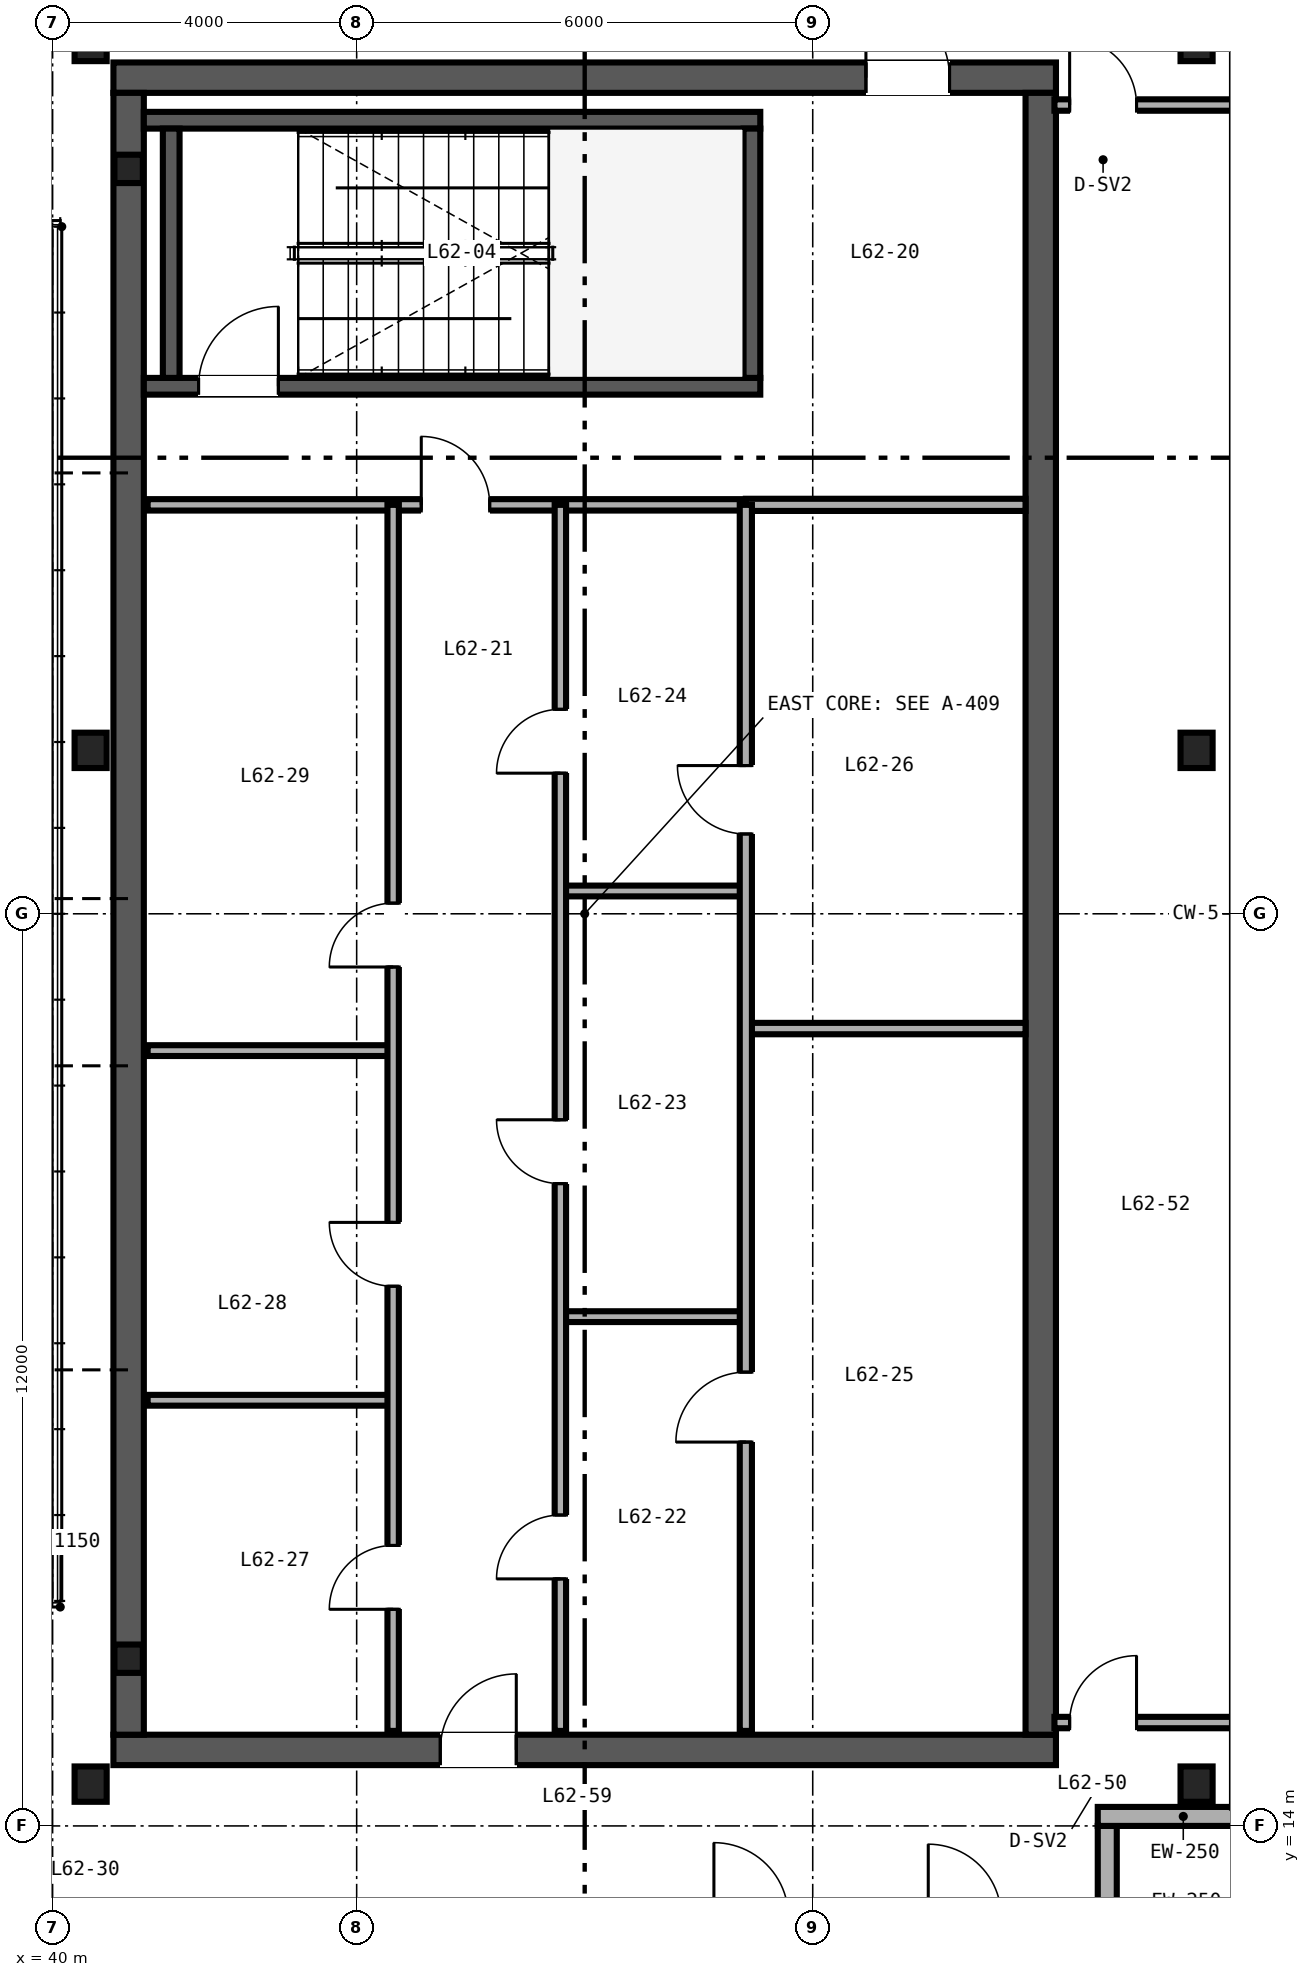
"""IFC4 building model, lengths in metres.
Left out: names, types, materials, properties, quantities, classifications, styles, units other than length and angle.
Written with IfcOpenShell. Run it as: python <this file> out.ifc"""

import sys

from ifc_helpers import new_model, si_unit, direction, frame, frame_2d, origin, origin_2d, place, context, subcontext, project, spatial, rectangle, i_section, extrude, source, transform, mapped, element, fill, save


model = new_model("IFC4")
c1 = context("Model", 3, precision=1e-05, world=origin(), true_north=direction((0.0, 1.0)))
c2 = subcontext(c1, "Body", "Model", "MODEL_VIEW")
j1 = project(units=[si_unit("LENGTHUNIT", "METRE"), si_unit("PLANEANGLEUNIT", "RADIAN")], contexts=[c1])
p1 = place(None, origin())
s1 = spatial("IfcSite", under=j1, at=p1, CompositionType="ELEMENT")
p2 = place(p1, origin())
s2 = spatial("IfcBuilding", under=s1, at=p2, CompositionType="ELEMENT")
p3 = place(p2, frame((0.0, 0.0, 247.2)))
s3 = spatial("IfcBuildingStorey", under=s2, at=p3, CompositionType="ELEMENT", Elevation=247.2)
m1 = source(origin(), c2, "Body", "SweptSolid", [
    extrude(i_section(OverallWidth=0.374, OverallDepth=0.373, WebThickness=0.016, FlangeThickness=0.026, FilletRadius=0.025, at=origin_2d()), origin(), (0.0, 0.0, 1.0), 3.6),
])
for number, where, z_axis, x_axis in (
    (1, (41.0, 16.2, 0.0), (0.0, 0.0, 1.0), (1.0, 0.0, 0.0)),
    (2, (41.0, 35.8, 0.0), (0.0, 0.0, 1.0), (1.0, 0.0, 0.0)),
):
    element("IfcColumn", number, at=place(p3, frame(where, z_axis=z_axis, x_axis=x_axis)), inside=s3, PredefinedType="COLUMN", context=c2, shape_type="MappedRepresentation", body=[
        mapped(m1, transform((0.0, 0.0, 0.0), scale=1.0)),
    ])
p4 = place(p3, frame((40.8, 15.0, 0.0), z_axis=(0.0, 0.0, 1.0), x_axis=(1.0, 0.0, 0.0)))
e3 = element("IfcWall", 3, at=p4, inside=s3, PredefinedType="SHEAR", context=c2, shape_type="SweptSolid", body=[
    extrude(rectangle(XDim=12.4, YDim=0.4, at=frame_2d((6.2, 0.0))), origin(), (0.0, 0.0, 1.0), 3.38),
])
p5 = place(p4, frame((4.3, 0.0, 0.0)))
e4 = element("IfcOpeningElement", 4, at=p5, cuts=e3, PredefinedType="OPENING", context=c2, shape_type="SweptSolid", body=[
    extrude(rectangle(XDim=1.0, YDim=2.15, at=frame_2d((0.5, 1.075))), frame((0.0, 0.21, 0.0), z_axis=(0.0, -1.0, 0.0), x_axis=(1.0, 0.0, 0.0)), (0.0, 0.0, 1.0), 0.42),
])
p6 = place(p3, frame((40.8, 37.0, 0.0), z_axis=(0.0, 0.0, 1.0), x_axis=(1.0, 0.0, 0.0)))
e5 = element("IfcWall", 5, at=p6, inside=s3, PredefinedType="SHEAR", context=c2, shape_type="SweptSolid", body=[
    extrude(rectangle(XDim=12.4, YDim=0.4, at=frame_2d((6.2, 0.0))), origin(), (0.0, 0.0, 1.0), 3.38),
])
p7 = place(p6, frame((9.9, 0.0, 0.0)))
e6 = element("IfcOpeningElement", 6, at=p7, cuts=e5, PredefinedType="OPENING", context=c2, shape_type="SweptSolid", body=[
    extrude(rectangle(XDim=1.1, YDim=2.15, at=frame_2d((0.55, 1.075))), frame((0.0, 0.21, 0.0), z_axis=(0.0, -1.0, 0.0), x_axis=(1.0, 0.0, 0.0)), (0.0, 0.0, 1.0), 0.42),
])
for number, where, z_axis, x_axis in (
    (7, (41.0, 15.2, 0.0), (0.0, 0.0, 1.0), (0.0, 1.0, 0.0)),
    (8, (53.0, 15.2, 0.0), (0.0, 0.0, 1.0), (0.0, 1.0, 0.0)),
):
    element("IfcWall", number, at=place(p3, frame(where, z_axis=z_axis, x_axis=x_axis)), inside=s3, PredefinedType="SHEAR", context=c2, shape_type="SweptSolid", body=[
        extrude(rectangle(XDim=21.6, YDim=0.4, at=frame_2d((10.8, 0.0))), origin(), (0.0, 0.0, 1.0), 3.38),
    ])
p8 = place(p3, frame((41.2, 32.94, 0.0), z_axis=(0.0, 0.0, 1.0), x_axis=(1.0, 0.0, 0.0)))
e9 = element("IfcWall", 9, at=p8, inside=s3, PredefinedType="SHEAR", context=c2, shape_type="SweptSolid", body=[
    extrude(rectangle(XDim=8.11, YDim=0.22, at=frame_2d((4.055, 0.0))), origin(), (0.0, 0.0, 1.0), 3.4),
])
p9 = place(p8, frame((0.72, 0.0, 0.0)))
e10 = element("IfcOpeningElement", 10, at=p9, cuts=e9, PredefinedType="OPENING", context=c2, shape_type="SweptSolid", body=[
    extrude(rectangle(XDim=1.05, YDim=2.15, at=frame_2d((0.525, 1.075))), frame((0.0, 0.12, 0.0), z_axis=(0.0, -1.0, 0.0), x_axis=(1.0, 0.0, 0.0)), (0.0, 0.0, 1.0), 0.24),
])
p10 = place(p3, frame((41.2, 36.44, 0.0), z_axis=(0.0, 0.0, 1.0), x_axis=(1.0, 0.0, 0.0)))
e11 = element("IfcWall", 11, at=p10, inside=s3, PredefinedType="SHEAR", context=c2, shape_type="SweptSolid", body=[
    extrude(rectangle(XDim=8.11, YDim=0.22, at=frame_2d((4.055, 0.0))), origin(), (0.0, 0.0, 1.0), 3.4),
])
for number, where, z_axis, x_axis in (
    (12, (41.56, 33.05, 0.0), (0.0, 0.0, 1.0), (0.0, 1.0, 0.0)),
    (13, (49.2, 33.05, 0.0), (0.0, 0.0, 1.0), (0.0, 1.0, 0.0)),
):
    element("IfcWall", number, at=place(p3, frame(where, z_axis=z_axis, x_axis=x_axis)), inside=s3, PredefinedType="SHEAR", context=c2, shape_type="SweptSolid", body=[
        extrude(rectangle(XDim=3.28, YDim=0.22, at=frame_2d((1.64, 0.0))), origin(), (0.0, 0.0, 1.0), 3.4),
    ])
m2 = source(origin(), c2, "Body", "SweptSolid", [
    extrude(i_section(OverallWidth=0.422, OverallDepth=0.465, WebThickness=0.045, FlangeThickness=0.073, FilletRadius=0.025, at=origin_2d()), origin(), (0.0, 0.0, 1.0), 3.38),
])
for number, where, z_axis, x_axis in (
    (14, (40.5, 14.55, 0.0), (0.0, 0.0, 1.0), (1.0, 0.0, 0.0)),
    (15, (55.05, 14.55, 0.0), (0.0, 0.0, 1.0), (1.0, 0.0, 0.0)),
    (16, (40.5, 28.15, 0.0), (0.0, 0.0, 1.0), (1.0, 0.0, 0.0)),
    (17, (55.05, 28.15, 0.0), (0.0, 0.0, 1.0), (1.0, 0.0, 0.0)),
    (18, (40.5, 37.45, 0.0), (0.0, 0.0, 1.0), (1.0, 0.0, 0.0)),
    (19, (55.05, 37.45, 0.0), (0.0, 0.0, 1.0), (1.0, 0.0, 0.0)),
):
    element("IfcColumn", number, at=place(p3, frame(where, z_axis=z_axis, x_axis=x_axis)), inside=s3, PredefinedType="COLUMN", context=c2, shape_type="MappedRepresentation", body=[
        mapped(m2, transform((0.0, 0.0, 0.0), scale=1.0)),
    ])
p11 = place(p3, frame((53.875, 12.0, 0.0), z_axis=(0.0, 0.0, 1.0), x_axis=(0.0, 1.0, 0.0)))
e20 = element("IfcWall", 20, at=p11, inside=s3, PredefinedType="SOLIDWALL", context=c2, shape_type="SweptSolid", body=[
    extrude(rectangle(XDim=2.0, YDim=0.25, at=frame_2d((1.0, 0.0))), origin(), (0.0, 0.0, 1.0), 3.38),
])
p12 = place(p3, frame((53.75, 14.125, 0.0), z_axis=(0.0, 0.0, 1.0), x_axis=(1.0, 0.0, 0.0)))
e21 = element("IfcWall", 21, at=p12, inside=s3, PredefinedType="SOLIDWALL", context=c2, shape_type="SweptSolid", body=[
    extrude(rectangle(XDim=2.25, YDim=0.25, at=frame_2d((1.125, 0.0))), origin(), (0.0, 0.0, 1.0), 3.38),
])
p13 = place(p3, frame((41.25, 31.38, 0.0), z_axis=(0.0, 0.0, 1.0), x_axis=(1.0, 0.0, 0.0)))
e22 = element("IfcWall", 22, at=p13, inside=s3, PredefinedType="PARTITIONING", context=c2, shape_type="SweptSolid", body=[
    extrude(rectangle(XDim=7.87, YDim=0.15, at=frame_2d((3.935, 0.0))), origin(), (0.0, 0.0, 1.0), 2.48),
])
p14 = place(p13, frame((3.6, 0.0, 0.0)))
e23 = element("IfcOpeningElement", 23, at=p14, cuts=e22, PredefinedType="OPENING", context=c2, shape_type="SweptSolid", body=[
    extrude(rectangle(XDim=0.9, YDim=2.15, at=frame_2d((0.45, 1.075))), frame((0.0, 0.085, 0.0), z_axis=(0.0, -1.0, 0.0), x_axis=(1.0, 0.0, 0.0)), (0.0, 0.0, 1.0), 0.17),
])
for number, where, z_axis, x_axis in (
    (24, (46.68, 20.7, 0.0), (0.0, 0.0, 1.0), (1.0, 0.0, 0.0)),
    (25, (46.68, 26.3, 0.0), (0.0, 0.0, 1.0), (1.0, 0.0, 0.0)),
):
    element("IfcWall", number, at=place(p3, frame(where, z_axis=z_axis, x_axis=x_axis)), inside=s3, PredefinedType="PARTITIONING", context=c2, shape_type="SweptSolid", body=[
        extrude(rectangle(XDim=2.44, YDim=0.142, at=frame_2d((1.22, 0.0))), origin(), (0.0, 0.0, 1.0), 3.38),
    ])
p15 = place(p3, frame((46.68, 15.25, 0.0), z_axis=(0.0, 0.0, 1.0), x_axis=(0.0, 1.0, 0.0)))
e26 = element("IfcWall", 26, at=p15, inside=s3, PredefinedType="PARTITIONING", context=c2, shape_type="SweptSolid", body=[
    extrude(rectangle(XDim=16.13, YDim=0.15, at=frame_2d((8.065, 0.0))), origin(), (0.0, 0.0, 1.0), 2.453),
])
p16 = place(p15, frame((2.0, 0.0, 0.0)))
e27 = element("IfcOpeningElement", 27, at=p16, cuts=e26, PredefinedType="OPENING", context=c2, shape_type="SweptSolid", body=[
    extrude(rectangle(XDim=0.84, YDim=2.1, at=frame_2d((0.42, 1.05))), frame((0.0, 0.085, 0.0), z_axis=(0.0, -1.0, 0.0), x_axis=(1.0, 0.0, 0.0)), (0.0, 0.0, 1.0), 0.17),
])
p17 = place(p15, frame((7.2, 0.0, 0.0)))
e28 = element("IfcOpeningElement", 28, at=p17, cuts=e26, PredefinedType="OPENING", context=c2, shape_type="SweptSolid", body=[
    extrude(rectangle(XDim=0.84, YDim=2.1, at=frame_2d((0.42, 1.05))), frame((0.0, 0.085, 0.0), z_axis=(0.0, -1.0, 0.0), x_axis=(1.0, 0.0, 0.0)), (0.0, 0.0, 1.0), 0.17),
])
p18 = place(p15, frame((12.6, 0.0, 0.0)))
e29 = element("IfcOpeningElement", 29, at=p18, cuts=e26, PredefinedType="OPENING", context=c2, shape_type="SweptSolid", body=[
    extrude(rectangle(XDim=0.84, YDim=2.1, at=frame_2d((0.42, 1.05))), frame((0.0, 0.085, 0.0), z_axis=(0.0, -1.0, 0.0), x_axis=(1.0, 0.0, 0.0)), (0.0, 0.0, 1.0), 0.17),
])
p19 = place(p3, frame((49.12, 31.38, 0.0), z_axis=(0.0, 0.0, 1.0), x_axis=(1.0, 0.0, 0.0)))
e30 = element("IfcWall", 30, at=p19, inside=s3, PredefinedType="PARTITIONING", context=c2, shape_type="SweptSolid", body=[
    extrude(rectangle(XDim=3.68, YDim=0.16, at=frame_2d((1.84, 0.0))), origin(), (0.0, 0.0, 1.0), 2.48),
])
p20 = place(p3, frame((49.12, 24.49, 0.0), z_axis=(0.0, 0.0, 1.0), x_axis=(1.0, 0.0, 0.0)))
e31 = element("IfcWall", 31, at=p20, inside=s3, PredefinedType="PARTITIONING", context=c2, shape_type="SweptSolid", body=[
    extrude(rectangle(XDim=3.68, YDim=0.15, at=frame_2d((1.84, 0.0))), origin(), (0.0, 0.0, 1.0), 3.38),
])
p21 = place(p3, frame((49.12, 15.25, 0.0), z_axis=(0.0, 0.0, 1.0), x_axis=(0.0, 1.0, 0.0)))
e32 = element("IfcWall", 32, at=p21, inside=s3, PredefinedType="PARTITIONING", context=c2, shape_type="SweptSolid", body=[
    extrude(rectangle(XDim=16.13, YDim=0.16, at=frame_2d((8.065, 0.0))), origin(), (0.0, 0.0, 1.0), 2.453),
])
p22 = place(p21, frame((3.8, 0.0, 0.0)))
e33 = element("IfcOpeningElement", 33, at=p22, cuts=e32, PredefinedType="OPENING", context=c2, shape_type="SweptSolid", body=[
    extrude(rectangle(XDim=0.92, YDim=2.15, at=frame_2d((0.46, 1.075))), frame((0.0, 0.09, 0.0), z_axis=(0.0, -1.0, 0.0), x_axis=(1.0, 0.0, 0.0)), (0.0, 0.0, 1.0), 0.18),
])
p23 = place(p21, frame((11.8, 0.0, 0.0)))
e34 = element("IfcOpeningElement", 34, at=p23, cuts=e32, PredefinedType="OPENING", context=c2, shape_type="SweptSolid", body=[
    extrude(rectangle(XDim=0.9, YDim=2.15, at=frame_2d((0.45, 1.075))), frame((0.0, 0.09, 0.0), z_axis=(0.0, -1.0, 0.0), x_axis=(1.0, 0.0, 0.0)), (0.0, 0.0, 1.0), 0.18),
])
for number, where, z_axis, x_axis in (
    (35, (41.25, 19.6, 0.0), (0.0, 0.0, 1.0), (1.0, 0.0, 0.0)),
    (36, (41.25, 24.2, 0.0), (0.0, 0.0, 1.0), (1.0, 0.0, 0.0)),
):
    element("IfcWall", number, at=place(p3, frame(where, z_axis=z_axis, x_axis=x_axis)), inside=s3, PredefinedType="PARTITIONING", context=c2, shape_type="SweptSolid", body=[
        extrude(rectangle(XDim=3.23, YDim=0.142, at=frame_2d((1.615, 0.0))), origin(), (0.0, 0.0, 1.0), 3.38),
    ])
p24 = place(p3, frame((44.48, 15.25, 0.0), z_axis=(0.0, 0.0, 1.0), x_axis=(0.0, 1.0, 0.0)))
e37 = element("IfcWall", 37, at=p24, inside=s3, PredefinedType="PARTITIONING", context=c2, shape_type="SweptSolid", body=[
    extrude(rectangle(XDim=16.13, YDim=0.15, at=frame_2d((8.065, 0.0))), origin(), (0.0, 0.0, 1.0), 2.453),
])
p25 = place(p24, frame((1.6, 0.0, 0.0)))
e38 = element("IfcOpeningElement", 38, at=p25, cuts=e37, PredefinedType="OPENING", context=c2, shape_type="SweptSolid", body=[
    extrude(rectangle(XDim=0.84, YDim=2.1, at=frame_2d((0.42, 1.05))), frame((0.0, 0.085, 0.0), z_axis=(0.0, -1.0, 0.0), x_axis=(1.0, 0.0, 0.0)), (0.0, 0.0, 1.0), 0.17),
])
p26 = place(p24, frame((5.85, 0.0, 0.0)))
e39 = element("IfcOpeningElement", 39, at=p26, cuts=e37, PredefinedType="OPENING", context=c2, shape_type="SweptSolid", body=[
    extrude(rectangle(XDim=0.84, YDim=2.1, at=frame_2d((0.42, 1.05))), frame((0.0, 0.085, 0.0), z_axis=(0.0, -1.0, 0.0), x_axis=(1.0, 0.0, 0.0)), (0.0, 0.0, 1.0), 0.17),
])
p27 = place(p24, frame((10.05, 0.0, 0.0)))
e40 = element("IfcOpeningElement", 40, at=p27, cuts=e37, PredefinedType="OPENING", context=c2, shape_type="SweptSolid", body=[
    extrude(rectangle(XDim=0.84, YDim=2.1, at=frame_2d((0.42, 1.05))), frame((0.0, 0.085, 0.0), z_axis=(0.0, -1.0, 0.0), x_axis=(1.0, 0.0, 0.0)), (0.0, 0.0, 1.0), 0.17),
])
p28 = place(p3, frame((53.18, 15.36, 0.0), z_axis=(0.0, 0.0, 1.0), x_axis=(1.0, 0.0, 0.0)))
e41 = element("IfcWall", 41, at=p28, inside=s3, PredefinedType="PARTITIONING", context=c2, shape_type="SweptSolid", body=[
    extrude(rectangle(XDim=2.66, YDim=0.15, at=frame_2d((1.33, 0.0))), origin(), (0.0, 0.0, 1.0), 2.601),
])
p29 = place(p28, frame((0.2, 0.0, 0.0)))
e42 = element("IfcOpeningElement", 42, at=p29, cuts=e41, PredefinedType="OPENING", context=c2, shape_type="SweptSolid", body=[
    extrude(rectangle(XDim=0.88, YDim=2.15, at=frame_2d((0.44, 1.075))), frame((0.0, 0.085, 0.0), z_axis=(0.0, -1.0, 0.0), x_axis=(1.0, 0.0, 0.0)), (0.0, 0.0, 1.0), 0.17),
])
p30 = place(p3, frame((53.18, 36.64, 0.0), z_axis=(0.0, 0.0, 1.0), x_axis=(1.0, 0.0, 0.0)))
e43 = element("IfcWall", 43, at=p30, inside=s3, PredefinedType="PARTITIONING", context=c2, shape_type="SweptSolid", body=[
    extrude(rectangle(XDim=2.66, YDim=0.15, at=frame_2d((1.33, 0.0))), origin(), (0.0, 0.0, 1.0), 2.763),
])
p31 = place(p30, frame((0.2, 0.0, 0.0)))
e44 = element("IfcOpeningElement", 44, at=p31, cuts=e43, PredefinedType="OPENING", context=c2, shape_type="SweptSolid", body=[
    extrude(rectangle(XDim=0.88, YDim=2.15, at=frame_2d((0.44, 1.075))), frame((0.0, 0.085, 0.0), z_axis=(0.0, -1.0, 0.0), x_axis=(1.0, 0.0, 0.0)), (0.0, 0.0, 1.0), 0.17),
])
m3 = source(origin(), c2, "Body", "SweptSolid", [
    extrude(rectangle(XDim=1.05, YDim=2.15, at=frame_2d((0.525, 1.075))), frame((0.0, 0.025, 0.0), z_axis=(0.0, -1.0, 0.0), x_axis=(1.0, 0.0, 0.0)), (0.0, 0.0, 1.0), 0.05),
])
p32 = place(p9, origin())
e45 = element("IfcDoor", 45, at=p32, inside=s3, OperationType="SINGLE_SWING_RIGHT", PredefinedType="DOOR", context=c2, shape_type="MappedRepresentation", body=[
    mapped(m3, transform((0.0, 0.0, 0.0), scale=1.0)),
])
fill(e10, e45)
m4 = source(origin(), c2, "Body", "SweptSolid", [
    extrude(rectangle(XDim=0.84, YDim=2.1, at=frame_2d((0.42, 1.05))), frame((0.0, 0.025, 0.0), z_axis=(0.0, -1.0, 0.0), x_axis=(1.0, 0.0, 0.0)), (0.0, 0.0, 1.0), 0.05),
])
p33 = place(p16, origin())
e46 = element("IfcDoor", 46, at=p33, inside=s3, OperationType="SINGLE_SWING_LEFT", PredefinedType="DOOR", context=c2, shape_type="MappedRepresentation", body=[
    mapped(m4, transform((0.0, 0.0, 0.0), scale=1.0)),
])
fill(e27, e46)
p34 = place(p17, origin())
e47 = element("IfcDoor", 47, at=p34, inside=s3, OperationType="SINGLE_SWING_RIGHT", PredefinedType="DOOR", context=c2, shape_type="MappedRepresentation", body=[
    mapped(m4, transform((0.0, 0.0, 0.0), scale=1.0)),
])
fill(e28, e47)
p35 = place(p18, origin())
e48 = element("IfcDoor", 48, at=p35, inside=s3, OperationType="SINGLE_SWING_LEFT", PredefinedType="DOOR", context=c2, shape_type="MappedRepresentation", body=[
    mapped(m4, transform((0.0, 0.0, 0.0), scale=1.0)),
])
fill(e29, e48)
m5 = source(origin(), c2, "Body", "SweptSolid", [
    extrude(rectangle(XDim=0.9, YDim=2.15, at=frame_2d((0.45, 1.075))), frame((0.0, 0.025, 0.0), z_axis=(0.0, -1.0, 0.0), x_axis=(1.0, 0.0, 0.0)), (0.0, 0.0, 1.0), 0.05),
])
p36 = place(p14, origin())
e49 = element("IfcDoor", 49, at=p36, inside=s3, OperationType="SINGLE_SWING_LEFT", PredefinedType="DOOR", context=c2, shape_type="MappedRepresentation", body=[
    mapped(m5, transform((0.0, 0.0, 0.0), scale=1.0)),
])
fill(e23, e49)
m6 = source(origin(), c2, "Body", "SweptSolid", [
    extrude(rectangle(XDim=1.0, YDim=2.15, at=frame_2d((0.5, 1.075))), frame((0.0, 0.025, 0.0), z_axis=(0.0, -1.0, 0.0), x_axis=(1.0, 0.0, 0.0)), (0.0, 0.0, 1.0), 0.05),
])
p37 = place(p5, origin())
e50 = element("IfcDoor", 50, at=p37, inside=s3, OperationType="SINGLE_SWING_RIGHT", PredefinedType="DOOR", context=c2, shape_type="MappedRepresentation", body=[
    mapped(m6, transform((0.0, 0.0, 0.0), scale=1.0)),
])
fill(e4, e50)
m7 = source(origin(), c2, "Body", "SweptSolid", [
    extrude(rectangle(XDim=1.1, YDim=2.15, at=frame_2d((0.55, 1.075))), frame((0.0, 0.025, 0.0), z_axis=(0.0, -1.0, 0.0), x_axis=(1.0, 0.0, 0.0)), (0.0, 0.0, 1.0), 0.05),
])
p38 = place(p7, origin())
e51 = element("IfcDoor", 51, at=p38, inside=s3, OperationType="SINGLE_SWING_LEFT", PredefinedType="DOOR", context=c2, shape_type="MappedRepresentation", body=[
    mapped(m7, transform((0.0, 0.0, 0.0), scale=1.0)),
])
fill(e6, e51)
m8 = source(origin(), c2, "Body", "SweptSolid", [
    extrude(rectangle(XDim=0.92, YDim=2.15, at=frame_2d((0.46, 1.075))), frame((0.0, 0.025, 0.0), z_axis=(0.0, -1.0, 0.0), x_axis=(1.0, 0.0, 0.0)), (0.0, 0.0, 1.0), 0.05),
])
p39 = place(p22, origin())
e52 = element("IfcDoor", 52, at=p39, inside=s3, OperationType="SINGLE_SWING_LEFT", PredefinedType="DOOR", context=c2, shape_type="MappedRepresentation", body=[
    mapped(m8, transform((0.0, 0.0, 0.0), scale=1.0)),
])
fill(e33, e52)
p40 = place(p23, origin())
e53 = element("IfcDoor", 53, at=p40, inside=s3, OperationType="SINGLE_SWING_RIGHT", PredefinedType="DOOR", context=c2, shape_type="MappedRepresentation", body=[
    mapped(m5, transform((0.0, 0.0, 0.0), scale=1.0)),
])
fill(e34, e53)
p41 = place(p25, origin())
e54 = element("IfcDoor", 54, at=p41, inside=s3, OperationType="SINGLE_SWING_LEFT", PredefinedType="DOOR", context=c2, shape_type="MappedRepresentation", body=[
    mapped(m4, transform((0.0, 0.0, 0.0), scale=1.0)),
])
fill(e38, e54)
p42 = place(p26, origin())
e55 = element("IfcDoor", 55, at=p42, inside=s3, OperationType="SINGLE_SWING_RIGHT", PredefinedType="DOOR", context=c2, shape_type="MappedRepresentation", body=[
    mapped(m4, transform((0.0, 0.0, 0.0), scale=1.0)),
])
fill(e39, e55)
p43 = place(p27, origin())
e56 = element("IfcDoor", 56, at=p43, inside=s3, OperationType="SINGLE_SWING_LEFT", PredefinedType="DOOR", context=c2, shape_type="MappedRepresentation", body=[
    mapped(m4, transform((0.0, 0.0, 0.0), scale=1.0)),
])
fill(e40, e56)
m9 = source(origin(), c2, "Body", "SweptSolid", [
    extrude(rectangle(XDim=0.88, YDim=2.15, at=frame_2d((0.44, 1.075))), frame((0.0, 0.025, 0.0), z_axis=(0.0, -1.0, 0.0), x_axis=(1.0, 0.0, 0.0)), (0.0, 0.0, 1.0), 0.05),
])
p44 = place(p29, origin())
e57 = element("IfcDoor", 57, at=p44, inside=s3, OperationType="SINGLE_SWING_RIGHT", PredefinedType="DOOR", context=c2, shape_type="MappedRepresentation", body=[
    mapped(m9, transform((0.0, 0.0, 0.0), scale=1.0)),
])
fill(e42, e57)
p45 = place(p31, origin())
e58 = element("IfcDoor", 58, at=p45, inside=s3, OperationType="SINGLE_SWING_LEFT", PredefinedType="DOOR", context=c2, shape_type="MappedRepresentation", body=[
    mapped(m9, transform((0.0, 0.0, 0.0), scale=1.0)),
])
fill(e44, e58)
save(model, sys.argv[1])
